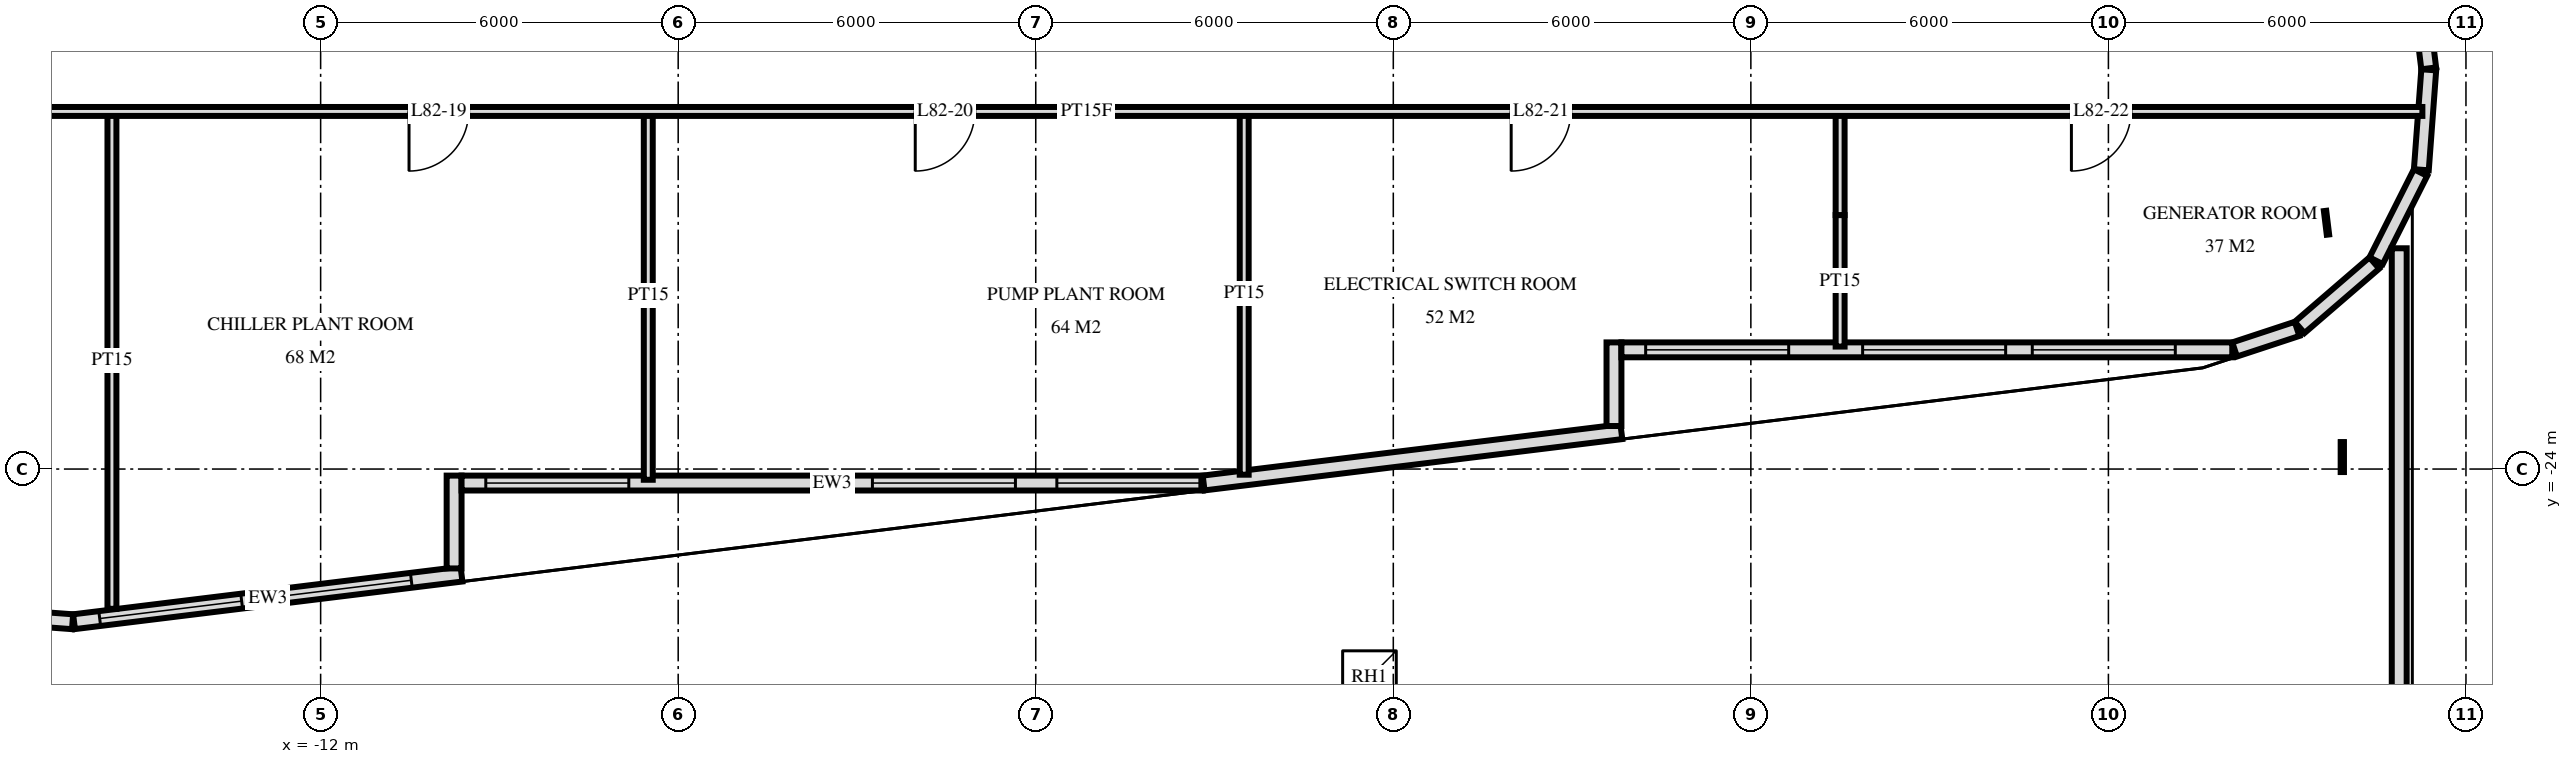
"""IFC4 building model, lengths in metres.
Left out: names, types, materials, properties, quantities, classifications, styles, units other than length and angle.
Written with IfcOpenShell. Run it as: python <this file> out.ifc"""

import sys

from ifc_helpers import new_model, si_unit, direction, frame, frame_2d, origin, origin_2d, place, context, subcontext, project, spatial, rectangle, extrude, element, fill, save


model = new_model("IFC4")
c1 = context("Model", 3, precision=1e-05, world=origin(), true_north=direction((0.0, 1.0)))
c2 = subcontext(c1, "Body", "Model", "MODEL_VIEW")
j1 = project(units=[si_unit("LENGTHUNIT", "METRE"), si_unit("PLANEANGLEUNIT", "RADIAN")], contexts=[c1])
p1 = place(None, origin())
s1 = spatial("IfcSite", under=j1, at=p1, CompositionType="ELEMENT")
p2 = place(p1, origin())
s2 = spatial("IfcBuilding", under=s1, at=p2, CompositionType="ELEMENT")
p3 = place(p2, frame((0.0, 0.0, 308.6)))
s3 = spatial("IfcBuildingStorey", under=s2, at=p3, CompositionType="ELEMENT", Elevation=308.6)
p4 = place(p3, frame((-17.84, -26.438, 0.0), z_axis=(0.0, 0.0, 1.0), x_axis=(0.997254267475, -0.074053534713, 0.0)))
e1 = element("IfcWall", 1, at=p4, inside=s3, PredefinedType="SOLIDWALL", context=c2, shape_type="SweptSolid", body=[
    extrude(rectangle(XDim=1.681, YDim=0.25, at=frame_2d((0.841, 0.0))), origin(), (0.0, 0.0, 1.0), 5.72),
])
p5 = place(p3, frame((-16.138, -26.561, 0.0), z_axis=(0.0, 0.0, 1.0), x_axis=(0.992550651974, 0.12183268554, 0.0)))
e2 = element("IfcWall", 2, at=p5, inside=s3, PredefinedType="SOLIDWALL", context=c2, shape_type="SweptSolid", body=[
    extrude(rectangle(XDim=6.551, YDim=0.25, at=frame_2d((3.275, 0.0))), origin(), (0.0, 0.0, 1.0), 5.72),
])
p6 = place(p5, frame((0.434, 0.0, 1.205)))
e3 = element("IfcOpeningElement", 3, at=p6, cuts=e2, PredefinedType="OPENING", context=c2, shape_type="SweptSolid", body=[
    extrude(rectangle(XDim=2.4, YDim=3.31, at=frame_2d((1.2, 1.655))), frame((0.0, 0.135, 0.0), z_axis=(0.0, -1.0, 0.0), x_axis=(1.0, 0.0, 0.0)), (0.0, 0.0, 1.0), 0.27),
])
p7 = place(p5, frame((3.302, 0.0, 1.205)))
e4 = element("IfcOpeningElement", 4, at=p7, cuts=e2, PredefinedType="OPENING", context=c2, shape_type="SweptSolid", body=[
    extrude(rectangle(XDim=2.4, YDim=3.31, at=frame_2d((1.2, 1.655))), frame((0.0, 0.135, 0.0), z_axis=(0.0, -1.0, 0.0), x_axis=(1.0, 0.0, 0.0)), (0.0, 0.0, 1.0), 0.27),
])
p8 = place(p3, frame((-9.76, -25.668, 0.0), z_axis=(0.0, 0.0, 1.0), x_axis=(0.0, 1.0, 0.0)))
e5 = element("IfcWall", 5, at=p8, inside=s3, PredefinedType="SOLIDWALL", context=c2, shape_type="SweptSolid", body=[
    extrude(rectangle(XDim=1.558, YDim=0.25, at=frame_2d((0.779, 0.0))), origin(), (0.0, 0.0, 1.0), 5.72),
])
p9 = place(p3, frame((-9.635, -24.235, 0.0), z_axis=(0.0, 0.0, 1.0), x_axis=(1.0, 0.0, 0.0)))
e6 = element("IfcWall", 6, at=p9, inside=s3, PredefinedType="SOLIDWALL", context=c2, shape_type="SweptSolid", body=[
    extrude(rectangle(XDim=12.437, YDim=0.25, at=frame_2d((6.219, 0.0))), origin(), (0.0, 0.0, 1.0), 5.72),
])
p10 = place(p9, frame((0.407, 0.0, 1.205)))
e7 = element("IfcOpeningElement", 7, at=p10, cuts=e6, PredefinedType="OPENING", context=c2, shape_type="SweptSolid", body=[
    extrude(rectangle(XDim=2.4, YDim=3.31, at=frame_2d((1.2, 1.655))), frame((0.0, 0.135, 0.0), z_axis=(0.0, -1.0, 0.0), x_axis=(1.0, 0.0, 0.0)), (0.0, 0.0, 1.0), 0.27),
])
p11 = place(p9, frame((6.895, 0.0, 1.205)))
e8 = element("IfcOpeningElement", 8, at=p11, cuts=e6, PredefinedType="OPENING", context=c2, shape_type="SweptSolid", body=[
    extrude(rectangle(XDim=2.4, YDim=3.31, at=frame_2d((1.2, 1.655))), frame((0.0, 0.135, 0.0), z_axis=(0.0, -1.0, 0.0), x_axis=(1.0, 0.0, 0.0)), (0.0, 0.0, 1.0), 0.27),
])
p12 = place(p9, frame((9.99, 0.0, 1.205)))
e9 = element("IfcOpeningElement", 9, at=p12, cuts=e6, PredefinedType="OPENING", context=c2, shape_type="SweptSolid", body=[
    extrude(rectangle(XDim=2.4, YDim=3.31, at=frame_2d((1.2, 1.655))), frame((0.0, 0.135, 0.0), z_axis=(0.0, -1.0, 0.0), x_axis=(1.0, 0.0, 0.0)), (0.0, 0.0, 1.0), 0.27),
])
p13 = place(p3, frame((2.817, -24.234, 0.0), z_axis=(0.0, 0.0, 1.0), x_axis=(0.992544629111, 0.121881742782, 0.0)))
e10 = element("IfcWall", 10, at=p13, inside=s3, PredefinedType="SOLIDWALL", context=c2, shape_type="SweptSolid", body=[
    extrude(rectangle(XDim=7.063, YDim=0.25, at=frame_2d((3.531, 0.0))), origin(), (0.0, 0.0, 1.0), 4.72),
])
p14 = place(p3, frame((9.703, -23.278, 0.0), z_axis=(0.0, 0.0, 1.0), x_axis=(0.0, 1.0, 0.0)))
e11 = element("IfcWall", 11, at=p14, inside=s3, PredefinedType="SOLIDWALL", context=c2, shape_type="SweptSolid", body=[
    extrude(rectangle(XDim=1.403, YDim=0.25, at=frame_2d((0.702, 0.0))), origin(), (0.0, 0.0, 1.0), 5.72),
])
p15 = place(p3, frame((9.828, -22.0, 0.0), z_axis=(0.0, 0.0, 1.0), x_axis=(1.0, 0.0, 0.0)))
e12 = element("IfcWall", 12, at=p15, inside=s3, PredefinedType="SOLIDWALL", context=c2, shape_type="SweptSolid", body=[
    extrude(rectangle(XDim=10.25, YDim=0.25, at=frame_2d((5.125, 0.0))), origin(), (0.0, 0.0, 1.0), 5.72),
])
p16 = place(p15, frame((0.407, 0.0, 1.205)))
e13 = element("IfcOpeningElement", 13, at=p16, cuts=e12, PredefinedType="OPENING", context=c2, shape_type="SweptSolid", body=[
    extrude(rectangle(XDim=2.4, YDim=3.31, at=frame_2d((1.2, 1.655))), frame((0.0, 0.135, 0.0), z_axis=(0.0, -1.0, 0.0), x_axis=(1.0, 0.0, 0.0)), (0.0, 0.0, 1.0), 0.27),
])
p17 = place(p15, frame((4.048, 0.0, 1.205)))
e14 = element("IfcOpeningElement", 14, at=p17, cuts=e12, PredefinedType="OPENING", context=c2, shape_type="SweptSolid", body=[
    extrude(rectangle(XDim=2.4, YDim=3.31, at=frame_2d((1.2, 1.655))), frame((0.0, 0.135, 0.0), z_axis=(0.0, -1.0, 0.0), x_axis=(1.0, 0.0, 0.0)), (0.0, 0.0, 1.0), 0.27),
])
p18 = place(p15, frame((6.895, 0.0, 1.205)))
e15 = element("IfcOpeningElement", 15, at=p18, cuts=e12, PredefinedType="OPENING", context=c2, shape_type="SweptSolid", body=[
    extrude(rectangle(XDim=2.4, YDim=3.31, at=frame_2d((1.2, 1.655))), frame((0.0, 0.135, 0.0), z_axis=(0.0, -1.0, 0.0), x_axis=(1.0, 0.0, 0.0)), (0.0, 0.0, 1.0), 0.27),
])
p19 = place(p3, frame((20.118, -21.994, 0.0), z_axis=(0.0, 0.0, 1.0), x_axis=(0.949674753288, 0.313237710001, 0.0)))
e16 = element("IfcWall", 16, at=p19, inside=s3, PredefinedType="SOLIDWALL", context=c2, shape_type="SweptSolid", body=[
    extrude(rectangle(XDim=1.103, YDim=0.25, at=frame_2d((0.551, 0.0))), origin(), (0.0, 0.0, 1.0), 5.72),
])
p20 = place(p3, frame((21.208, -21.624, 0.0), z_axis=(0.0, 0.0, 1.0), x_axis=(0.757568315466, 0.652755886531, 0.0)))
e17 = element("IfcWall", 17, at=p20, inside=s3, PredefinedType="SOLIDWALL", context=c2, shape_type="SweptSolid", body=[
    extrude(rectangle(XDim=1.656, YDim=0.25, at=frame_2d((0.828, 0.0))), origin(), (0.0, 0.0, 1.0), 5.72),
])
p21 = place(p3, frame((22.493, -20.505, 0.0), z_axis=(0.0, 0.0, 1.0), x_axis=(0.449982385812, 0.893037430604, 0.0)))
e18 = element("IfcWall", 18, at=p21, inside=s3, PredefinedType="SOLIDWALL", context=c2, shape_type="SweptSolid", body=[
    extrude(rectangle(XDim=1.656, YDim=0.25, at=frame_2d((0.828, 0.0))), origin(), (0.0, 0.0, 1.0), 5.72),
])
p22 = place(p3, frame((23.251, -18.979, 0.0), z_axis=(0.0, 0.0, 1.0), x_axis=(0.074053534713, 0.997254267475, 0.0)))
e19 = element("IfcWall", 19, at=p22, inside=s3, PredefinedType="SOLIDWALL", context=c2, shape_type="SweptSolid", body=[
    extrude(rectangle(XDim=1.681, YDim=0.25, at=frame_2d((0.841, 0.0))), origin(), (0.0, 0.0, 1.0), 5.72),
])
p23 = place(p3, frame((23.375, -17.277, 0.0), z_axis=(0.0, 0.0, 1.0), x_axis=(-0.121862878281, 0.992546945437, 0.0)))
e20 = element("IfcWall", 20, at=p23, inside=s3, PredefinedType="SOLIDWALL", context=c2, shape_type="SweptSolid", body=[
    extrude(rectangle(XDim=19.151, YDim=0.25, at=frame_2d((9.575, 0.0))), origin(), (0.0, 0.0, 1.0), 5.72),
])
p24 = place(p23, frame((0.396, 0.0, 0.858)))
e21 = element("IfcOpeningElement", 21, at=p24, cuts=e20, PredefinedType="OPENING", context=c2, shape_type="SweptSolid", body=[
    extrude(rectangle(XDim=2.4, YDim=3.6, at=frame_2d((1.2, 1.8))), frame((0.0, 0.135, 0.0), z_axis=(0.0, -1.0, 0.0), x_axis=(1.0, 0.0, 0.0)), (0.0, 0.0, 1.0), 0.27),
])
p25 = place(p23, frame((3.588, 0.0, 0.858)))
e22 = element("IfcOpeningElement", 22, at=p25, cuts=e20, PredefinedType="OPENING", context=c2, shape_type="SweptSolid", body=[
    extrude(rectangle(XDim=2.4, YDim=3.6, at=frame_2d((1.2, 1.8))), frame((0.0, 0.135, 0.0), z_axis=(0.0, -1.0, 0.0), x_axis=(1.0, 0.0, 0.0)), (0.0, 0.0, 1.0), 0.27),
])
p26 = place(p23, frame((6.78, 0.0, 0.858)))
e23 = element("IfcOpeningElement", 23, at=p26, cuts=e20, PredefinedType="OPENING", context=c2, shape_type="SweptSolid", body=[
    extrude(rectangle(XDim=2.4, YDim=3.6, at=frame_2d((1.2, 1.8))), frame((0.0, 0.135, 0.0), z_axis=(0.0, -1.0, 0.0), x_axis=(1.0, 0.0, 0.0)), (0.0, 0.0, 1.0), 0.27),
])
p27 = place(p23, frame((9.971, 0.0, 0.858)))
e24 = element("IfcOpeningElement", 24, at=p27, cuts=e20, PredefinedType="OPENING", context=c2, shape_type="SweptSolid", body=[
    extrude(rectangle(XDim=2.4, YDim=3.6, at=frame_2d((1.2, 1.8))), frame((0.0, 0.135, 0.0), z_axis=(0.0, -1.0, 0.0), x_axis=(1.0, 0.0, 0.0)), (0.0, 0.0, 1.0), 0.27),
])
p28 = place(p23, frame((13.463, 0.0, 0.0)))
e25 = element("IfcOpeningElement", 25, at=p28, cuts=e20, PredefinedType="OPENING", context=c2, shape_type="SweptSolid", body=[
    extrude(rectangle(XDim=1.8, YDim=2.4, at=frame_2d((0.9, 1.2))), frame((0.0, 0.135, 0.0), z_axis=(0.0, -1.0, 0.0), x_axis=(1.0, 0.0, 0.0)), (0.0, 0.0, 1.0), 0.27),
])
p29 = place(p23, frame((16.355, 0.0, 0.858)))
e26 = element("IfcOpeningElement", 26, at=p29, cuts=e20, PredefinedType="OPENING", context=c2, shape_type="SweptSolid", body=[
    extrude(rectangle(XDim=2.4, YDim=3.6, at=frame_2d((1.2, 1.8))), frame((0.0, 0.135, 0.0), z_axis=(0.0, -1.0, 0.0), x_axis=(1.0, 0.0, 0.0)), (0.0, 0.0, 1.0), 0.27),
])
p30 = place(p3, frame((22.88, -20.296, 0.0), z_axis=(0.0, 0.0, 1.0), x_axis=(0.0, -1.0, 0.0)))
e27 = element("IfcWall", 27, at=p30, inside=s3, PredefinedType="PARAPET", context=c2, shape_type="SweptSolid", body=[
    extrude(rectangle(XDim=8.982, YDim=0.25, at=frame_2d((4.491, 0.0))), origin(), (0.0, 0.0, 1.0), 1.1),
])
p31 = place(p3, frame((13.498, -21.945, 0.0), z_axis=(0.0, 0.0, 1.0), x_axis=(0.0, 1.0, 0.0)))
e28 = element("IfcWall", 28, at=p31, inside=s3, PredefinedType="PARTITIONING", context=c2, shape_type="SweptSolid", body=[
    extrude(rectangle(XDim=2.207, YDim=0.15, at=frame_2d((1.104, 0.0))), origin(), (0.0, 0.0, 1.0), 4.52),
])
p32 = place(p3, frame((3.498, -24.095, 0.0), z_axis=(0.0, 0.0, 1.0), x_axis=(0.0, 1.0, 0.0)))
e29 = element("IfcWall", 29, at=p32, inside=s3, PredefinedType="PARTITIONING", context=c2, shape_type="SweptSolid", body=[
    extrude(rectangle(XDim=6.095, YDim=0.15, at=frame_2d((3.047, 0.0))), origin(), (0.0, 0.0, 1.0), 5.7),
])
p33 = place(p3, frame((-6.502, -24.18, 0.0), z_axis=(0.0, 0.0, 1.0), x_axis=(0.0, 1.0, 0.0)))
e30 = element("IfcWall", 30, at=p33, inside=s3, PredefinedType="PARTITIONING", context=c2, shape_type="SweptSolid", body=[
    extrude(rectangle(XDim=6.18, YDim=0.15, at=frame_2d((3.09, 0.0))), origin(), (0.0, 0.0, 1.0), 5.7),
])
p34 = place(p3, frame((-15.502, -26.345, 0.0), z_axis=(0.0, 0.0, 1.0), x_axis=(0.0, 1.0, 0.0)))
e31 = element("IfcWall", 31, at=p34, inside=s3, PredefinedType="PARTITIONING", context=c2, shape_type="SweptSolid", body=[
    extrude(rectangle(XDim=8.345, YDim=0.15, at=frame_2d((4.173, 0.0))), origin(), (0.0, 0.0, 1.0), 5.7),
])
p35 = place(p3, frame((-21.567, -18.0, 0.0), z_axis=(0.0, 0.0, 1.0), x_axis=(1.0, 0.0, 0.0)))
e32 = element("IfcWall", 32, at=p35, inside=s3, PredefinedType="PARTITIONING", context=c2, shape_type="SweptSolid", body=[
    extrude(rectangle(XDim=44.835, YDim=0.15, at=frame_2d((22.418, 0.0))), origin(), (0.0, 0.0, 1.0), 5.7),
])
p36 = place(p35, frame((2.445, 0.0, 0.0)))
e33 = element("IfcOpeningElement", 33, at=p36, cuts=e32, PredefinedType="OPENING", context=c2, shape_type="SweptSolid", body=[
    extrude(rectangle(XDim=1.0, YDim=2.1, at=frame_2d((0.5, 1.05))), frame((0.0, 0.085, 0.0), z_axis=(0.0, -1.0, 0.0), x_axis=(1.0, 0.0, 0.0)), (0.0, 0.0, 1.0), 0.17),
])
p37 = place(p35, frame((11.05, 0.0, 0.0)))
e34 = element("IfcOpeningElement", 34, at=p37, cuts=e32, PredefinedType="OPENING", context=c2, shape_type="SweptSolid", body=[
    extrude(rectangle(XDim=1.0, YDim=2.1, at=frame_2d((0.5, 1.05))), frame((0.0, 0.085, 0.0), z_axis=(0.0, -1.0, 0.0), x_axis=(1.0, 0.0, 0.0)), (0.0, 0.0, 1.0), 0.17),
])
p38 = place(p35, frame((19.545, 0.0, 0.0)))
e35 = element("IfcOpeningElement", 35, at=p38, cuts=e32, PredefinedType="OPENING", context=c2, shape_type="SweptSolid", body=[
    extrude(rectangle(XDim=1.0, YDim=2.1, at=frame_2d((0.5, 1.05))), frame((0.0, 0.085, 0.0), z_axis=(0.0, -1.0, 0.0), x_axis=(1.0, 0.0, 0.0)), (0.0, 0.0, 1.0), 0.17),
])
p39 = place(p35, frame((29.545, 0.0, 0.0)))
e36 = element("IfcOpeningElement", 36, at=p39, cuts=e32, PredefinedType="OPENING", context=c2, shape_type="SweptSolid", body=[
    extrude(rectangle(XDim=1.0, YDim=2.1, at=frame_2d((0.5, 1.05))), frame((0.0, 0.085, 0.0), z_axis=(0.0, -1.0, 0.0), x_axis=(1.0, 0.0, 0.0)), (0.0, 0.0, 1.0), 0.17),
])
p40 = place(p35, frame((38.946, 0.0, 0.0)))
e37 = element("IfcOpeningElement", 37, at=p40, cuts=e32, PredefinedType="OPENING", context=c2, shape_type="SweptSolid", body=[
    extrude(rectangle(XDim=1.0, YDim=2.1, at=frame_2d((0.5, 1.05))), frame((0.0, 0.085, 0.0), z_axis=(0.0, -1.0, 0.0), x_axis=(1.0, 0.0, 0.0)), (0.0, 0.0, 1.0), 0.17),
])
p41 = place(p3, frame((13.498, -19.738, 0.0), z_axis=(0.0, 0.0, 1.0), x_axis=(0.0, 1.0, 0.0)))
e38 = element("IfcWall", 38, at=p41, inside=s3, PredefinedType="PARTITIONING", context=c2, shape_type="SweptSolid", body=[
    extrude(rectangle(XDim=1.738, YDim=0.15, at=frame_2d((0.869, 0.0))), origin(), (0.0, 0.0, 1.0), 5.7),
])
p42 = place(p6, origin())
e39 = element("IfcWindow", 39, at=p42, inside=s3, PartitioningType="SINGLE_PANEL", PredefinedType="USERDEFINED", context=c2, shape_type="SweptSolid", body=[
    extrude(rectangle(XDim=2.4, YDim=3.31, at=frame_2d((1.2, 1.655))), frame((0.0, 0.03, 0.0), z_axis=(0.0, -1.0, 0.0), x_axis=(1.0, 0.0, 0.0)), (0.0, 0.0, 1.0), 0.06),
])
fill(e3, e39)
p43 = place(p7, origin())
e40 = element("IfcWindow", 40, at=p43, inside=s3, PartitioningType="SINGLE_PANEL", PredefinedType="USERDEFINED", context=c2, shape_type="SweptSolid", body=[
    extrude(rectangle(XDim=2.4, YDim=3.31, at=frame_2d((1.2, 1.655))), frame((0.0, 0.03, 0.0), z_axis=(0.0, -1.0, 0.0), x_axis=(1.0, 0.0, 0.0)), (0.0, 0.0, 1.0), 0.06),
])
fill(e4, e40)
p44 = place(p10, origin())
e41 = element("IfcWindow", 41, at=p44, inside=s3, PartitioningType="SINGLE_PANEL", PredefinedType="USERDEFINED", context=c2, shape_type="SweptSolid", body=[
    extrude(rectangle(XDim=2.4, YDim=3.31, at=frame_2d((1.2, 1.655))), frame((0.0, 0.125, 0.0), z_axis=(0.0, -1.0, 0.0), x_axis=(1.0, 0.0, 0.0)), (0.0, 0.0, 1.0), 0.06),
])
fill(e7, e41)
p45 = place(p11, origin())
e42 = element("IfcWindow", 42, at=p45, inside=s3, PartitioningType="SINGLE_PANEL", PredefinedType="USERDEFINED", context=c2, shape_type="SweptSolid", body=[
    extrude(rectangle(XDim=2.4, YDim=3.31, at=frame_2d((1.2, 1.655))), frame((0.0, 0.125, 0.0), z_axis=(0.0, -1.0, 0.0), x_axis=(1.0, 0.0, 0.0)), (0.0, 0.0, 1.0), 0.06),
])
fill(e8, e42)
p46 = place(p12, origin())
e43 = element("IfcWindow", 43, at=p46, inside=s3, PartitioningType="SINGLE_PANEL", PredefinedType="USERDEFINED", context=c2, shape_type="SweptSolid", body=[
    extrude(rectangle(XDim=2.4, YDim=3.31, at=frame_2d((1.2, 1.655))), frame((0.0, 0.125, 0.0), z_axis=(0.0, -1.0, 0.0), x_axis=(1.0, 0.0, 0.0)), (0.0, 0.0, 1.0), 0.06),
])
fill(e9, e43)
p47 = place(p16, origin())
e44 = element("IfcWindow", 44, at=p47, inside=s3, PartitioningType="SINGLE_PANEL", PredefinedType="USERDEFINED", context=c2, shape_type="SweptSolid", body=[
    extrude(rectangle(XDim=2.4, YDim=3.31, at=frame_2d((1.2, 1.655))), frame((0.0, 0.125, 0.0), z_axis=(0.0, -1.0, 0.0), x_axis=(1.0, 0.0, 0.0)), (0.0, 0.0, 1.0), 0.06),
])
fill(e13, e44)
p48 = place(p17, origin())
e45 = element("IfcWindow", 45, at=p48, inside=s3, PartitioningType="SINGLE_PANEL", PredefinedType="USERDEFINED", context=c2, shape_type="SweptSolid", body=[
    extrude(rectangle(XDim=2.4, YDim=3.31, at=frame_2d((1.2, 1.655))), frame((0.0, 0.125, 0.0), z_axis=(0.0, -1.0, 0.0), x_axis=(1.0, 0.0, 0.0)), (0.0, 0.0, 1.0), 0.06),
])
fill(e14, e45)
p49 = place(p18, origin())
e46 = element("IfcWindow", 46, at=p49, inside=s3, PartitioningType="SINGLE_PANEL", PredefinedType="USERDEFINED", context=c2, shape_type="SweptSolid", body=[
    extrude(rectangle(XDim=2.4, YDim=3.31, at=frame_2d((1.2, 1.655))), frame((0.0, 0.125, 0.0), z_axis=(0.0, -1.0, 0.0), x_axis=(1.0, 0.0, 0.0)), (0.0, 0.0, 1.0), 0.06),
])
fill(e15, e46)
p50 = place(p3, frame((0.0, 0.0, -0.3)))
p51 = place(p50, frame((5.6, -27.5, 0.0)))
p52 = place(p51, frame((0.0, 0.0, 0.25)))
e47 = element("IfcWindow", 47, at=p52, inside=s3, PartitioningType="SINGLE_PANEL", PredefinedType="SKYLIGHT", context=c2, shape_type="SweptSolid", body=[
    extrude(rectangle(XDim=0.9, YDim=0.9, at=origin_2d()), origin(), (0.0, 0.0, 1.0), 0.05),
])
p53 = place(p37, frame((0.5, 0.0, 0.0), z_axis=(0.0, 0.0, 1.0), x_axis=(-1.0, 0.0, 0.0)))
e48 = element("IfcDoor", 48, at=p53, inside=s3, OperationType="SINGLE_SWING_LEFT", PredefinedType="DOOR", context=c2, shape_type="SweptSolid", body=[
    extrude(rectangle(XDim=1.0, YDim=2.1, at=frame_2d((0.0, 1.05))), frame((0.0, -0.025, 0.0), z_axis=(0.0, 1.0, 0.0), x_axis=(-1.0, 0.0, 0.0)), (0.0, 0.0, 1.0), 0.05),
])
fill(e34, e48)
p54 = place(p38, frame((0.5, 0.0, 0.0), z_axis=(0.0, 0.0, 1.0), x_axis=(-1.0, 0.0, 0.0)))
e49 = element("IfcDoor", 49, at=p54, inside=s3, OperationType="SINGLE_SWING_LEFT", PredefinedType="DOOR", context=c2, shape_type="SweptSolid", body=[
    extrude(rectangle(XDim=1.0, YDim=2.1, at=frame_2d((0.0, 1.05))), frame((0.0, -0.025, 0.0), z_axis=(0.0, 1.0, 0.0), x_axis=(-1.0, 0.0, 0.0)), (0.0, 0.0, 1.0), 0.05),
])
fill(e35, e49)
p55 = place(p39, frame((0.5, 0.0, 0.0), z_axis=(0.0, 0.0, 1.0), x_axis=(-1.0, 0.0, 0.0)))
e50 = element("IfcDoor", 50, at=p55, inside=s3, OperationType="SINGLE_SWING_LEFT", PredefinedType="DOOR", context=c2, shape_type="SweptSolid", body=[
    extrude(rectangle(XDim=1.0, YDim=2.1, at=frame_2d((0.0, 1.05))), frame((0.0, -0.025, 0.0), z_axis=(0.0, 1.0, 0.0), x_axis=(-1.0, 0.0, 0.0)), (0.0, 0.0, 1.0), 0.05),
])
fill(e36, e50)
p56 = place(p40, frame((0.5, 0.0, 0.0), z_axis=(0.0, 0.0, 1.0), x_axis=(-1.0, 0.0, 0.0)))
e51 = element("IfcDoor", 51, at=p56, inside=s3, OperationType="SINGLE_SWING_LEFT", PredefinedType="DOOR", context=c2, shape_type="SweptSolid", body=[
    extrude(rectangle(XDim=1.0, YDim=2.1, at=frame_2d((0.0, 1.05))), frame((0.0, -0.025, 0.0), z_axis=(0.0, 1.0, 0.0), x_axis=(-1.0, 0.0, 0.0)), (0.0, 0.0, 1.0), 0.05),
])
fill(e37, e51)
save(model, sys.argv[1])
